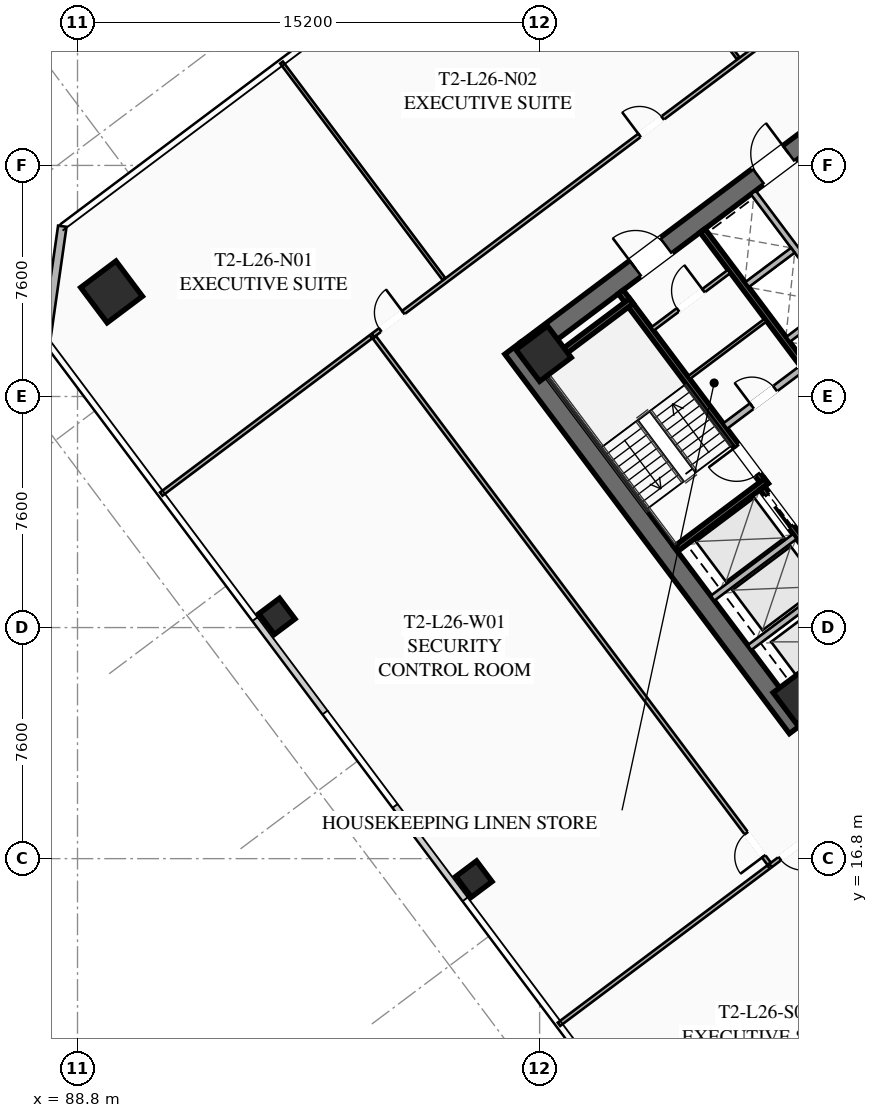
"""IFC4 building model, lengths in metres.
Left out: names, types, materials, properties, quantities, classifications, styles, units other than length and angle.
Written with IfcOpenShell. Run it as: python <this file> out.ifc"""

import sys

from ifc_helpers import new_model, si_unit, direction, frame, frame_2d, origin, origin_2d, place, context, subcontext, project, spatial, rectangle, hollow_rectangle, extrude, element, fill, save


model = new_model("IFC4")
c1 = context("Model", 3, precision=1e-05, world=origin(), true_north=direction((0.0, 1.0)))
c2 = subcontext(c1, "Body", "Model", "MODEL_VIEW")
j1 = project(units=[si_unit("LENGTHUNIT", "METRE"), si_unit("PLANEANGLEUNIT", "RADIAN")], contexts=[c1])
p1 = place(None, origin())
s1 = spatial("IfcSite", under=j1, at=p1, CompositionType="ELEMENT")
p2 = place(p1, origin())
s2 = spatial("IfcBuilding", under=s1, at=p2, CompositionType="ELEMENT")
p3 = place(p2, frame((0.0, 0.0, 99.15)))
s3 = spatial("IfcBuildingStorey", under=s2, at=p3, CompositionType="ELEMENT", Elevation=99.15)
p4 = place(p3, frame((112.476, 21.107, 0.0), z_axis=(0.0, 0.0, 1.0), x_axis=(-0.600005007985, 0.799996243986, 0.0)))
e1 = element("IfcWall", 1, at=p4, inside=s3, PredefinedType="SHEAR", context=c2, shape_type="SweptSolid", body=[
    extrude(rectangle(XDim=15.6, YDim=0.65, at=frame_2d((7.8, 0.0))), origin(), (0.0, 0.0, 1.0), 3.55),
])
p5 = place(p3, frame((124.429, 30.478, 0.0), z_axis=(0.0, 0.0, 1.0), x_axis=(-0.799998028465, -0.600002628705, 0.0)))
e2 = element("IfcWall", 2, at=p5, inside=s3, PredefinedType="SHEAR", context=c2, shape_type="SweptSolid", body=[
    extrude(rectangle(XDim=14.86, YDim=0.65, at=frame_2d((7.43, 0.0))), origin(), (0.0, 0.0, 1.0), 3.55),
])
p6 = place(p5, frame((9.13, 0.0, 0.0)))
e3 = element("IfcOpeningElement", 3, at=p6, cuts=e2, PredefinedType="OPENING", context=c2, shape_type="SweptSolid", body=[
    extrude(rectangle(XDim=1.25, YDim=2.25, at=frame_2d((0.625, 1.125))), frame((0.0, 0.335, 0.0), z_axis=(0.0, -1.0, 0.0), x_axis=(1.0, 0.0, 0.0)), (0.0, 0.0, 1.0), 0.67),
])
p7 = place(p5, frame((4.08, 0.0, 0.0)))
e4 = element("IfcOpeningElement", 4, at=p7, cuts=e2, PredefinedType="OPENING", context=c2, shape_type="SweptSolid", body=[
    extrude(rectangle(XDim=1.25, YDim=2.25, at=frame_2d((0.625, 1.125))), frame((0.0, 0.335, 0.0), z_axis=(0.0, -1.0, 0.0), x_axis=(1.0, 0.0, 0.0)), (0.0, 0.0, 1.0), 0.67),
])
p8 = place(p3, frame((103.571, 33.522, 0.0), z_axis=(0.0, 0.0, 1.0), x_axis=(0.799998028465, 0.600002628705, 0.0)))
e5 = element("IfcWall", 5, at=p8, inside=s3, PredefinedType="SHEAR", context=c2, shape_type="SweptSolid", body=[
    extrude(rectangle(XDim=14.86, YDim=0.65, at=frame_2d((7.43, 0.0))), origin(), (0.0, 0.0, 1.0), 3.55),
])
p9 = place(p8, frame((4.48, 0.0, 0.0)))
e6 = element("IfcOpeningElement", 6, at=p9, cuts=e5, PredefinedType="OPENING", context=c2, shape_type="SweptSolid", body=[
    extrude(rectangle(XDim=1.25, YDim=2.25, at=frame_2d((0.625, 1.125))), frame((0.0, 0.335, 0.0), z_axis=(0.0, -1.0, 0.0), x_axis=(1.0, 0.0, 0.0)), (0.0, 0.0, 1.0), 0.67),
])
p10 = place(p8, frame((9.53, 0.0, 0.0)))
e7 = element("IfcOpeningElement", 7, at=p10, cuts=e5, PredefinedType="OPENING", context=c2, shape_type="SweptSolid", body=[
    extrude(rectangle(XDim=1.25, YDim=2.25, at=frame_2d((0.625, 1.125))), frame((0.0, 0.335, 0.0), z_axis=(0.0, -1.0, 0.0), x_axis=(1.0, 0.0, 0.0)), (0.0, 0.0, 1.0), 0.67),
])
for number, where, z_axis, x_axis in (
    (8, (112.59, 22.13, 0.0), (0.0, 0.0, 1.0), (0.8, 0.6, 0.0)),
    (9, (104.13, 33.41, 0.0), (0.0, 0.0, 1.0), (0.8, 0.6, 0.0)),
):
    element("IfcColumn", number, at=place(p3, frame(where, z_axis=z_axis, x_axis=x_axis)), inside=s3, PredefinedType="COLUMN", context=c2, shape_type="SweptSolid", body=[
        extrude(hollow_rectangle(XDim=1.3, YDim=1.3, WallThickness=0.05, at=origin_2d()), origin(), (0.0, 0.0, 1.0), 3.35),
    ])
p11 = place(p3, frame((89.92, 35.44, 0.0), z_axis=(0.0, 0.0, 1.0), x_axis=(0.799999996291, 0.600000004945, 0.0)))
e10 = element("IfcColumn", 10, at=p11, inside=s3, PredefinedType="COLUMN", context=c2, shape_type="SweptSolid", body=[
    extrude(hollow_rectangle(XDim=1.45, YDim=1.45, WallThickness=0.055, at=origin_2d()), origin(), (0.0, 0.0, 1.0), 3.35),
])
for number, where, z_axis, x_axis in (
    (11, (95.36, 24.77, 0.0), (0.0, 0.0, 1.0), (0.8, 0.6, 0.0)),
    (12, (101.84, 16.13, 0.0), (0.0, 0.0, 1.0), (0.8, 0.6, 0.0)),
):
    element("IfcColumn", number, at=place(p3, frame(where, z_axis=z_axis, x_axis=x_axis)), inside=s3, PredefinedType="COLUMN", context=c2, shape_type="SweptSolid", body=[
        extrude(hollow_rectangle(XDim=0.85, YDim=0.85, WallThickness=0.035, at=origin_2d()), origin(), (0.0, 0.0, 1.0), 3.35),
    ])
p12 = place(p3, frame((87.76, 33.82, 0.0), z_axis=(0.0, 0.0, 1.0), x_axis=(0.141430307517, 0.989948214866, 0.0)))
e13 = element("IfcWall", 13, at=p12, inside=s3, PredefinedType="SOLIDWALL", context=c2, shape_type="SweptSolid", body=[
    extrude(rectangle(XDim=3.818, YDim=0.28, at=frame_2d((1.909, 0.0))), origin(), (0.0, 0.0, 1.0), 3.35),
])
p13 = place(p3, frame((111.44, 29.08, 0.0), z_axis=(0.0, 0.0, 1.0), x_axis=(-0.600009827119, 0.799992629566, 0.0)))
e14 = element("IfcWall", 14, at=p13, inside=s3, PredefinedType="SHEAR", context=c2, shape_type="SweptSolid", body=[
    extrude(rectangle(XDim=7.95, YDim=0.2, at=frame_2d((3.975, 0.0))), origin(), (0.0, 0.0, 1.0), 3.35),
])
p14 = place(p13, frame((0.45, 0.0, 0.0)))
e15 = element("IfcOpeningElement", 15, at=p14, cuts=e14, PredefinedType="OPENING", context=c2, shape_type="SweptSolid", body=[
    extrude(rectangle(XDim=1.15, YDim=2.2, at=frame_2d((0.575, 1.1))), frame((0.0, 0.11, 0.0), z_axis=(0.0, -1.0, 0.0), x_axis=(1.0, 0.0, 0.0)), (0.0, 0.0, 1.0), 0.22),
])
for number, where, z_axis, x_axis in (
    (16, (108.476, 26.982, 0.0), (0.0, 0.0, 1.0), (0.8, 0.6, 0.0)),
    (17, (104.036, 32.902, 0.0), (0.0, 0.0, 1.0), (0.8, 0.6, 0.0)),
):
    element("IfcWall", number, at=place(p3, frame(where, z_axis=z_axis, x_axis=x_axis)), inside=s3, PredefinedType="SHEAR", context=c2, shape_type="SweptSolid", body=[
        extrude(rectangle(XDim=3.73, YDim=0.2, at=frame_2d((1.865, 0.0))), origin(), (0.0, 0.0, 1.0), 3.35),
    ])
p15 = place(p3, frame((117.938, 26.016, 0.0), z_axis=(0.0, 0.0, 1.0), x_axis=(-0.600005463273, 0.799995902516, 0.0)))
e18 = element("IfcWall", 18, at=p15, inside=s3, PredefinedType="SHEAR", context=c2, shape_type="SweptSolid", body=[
    extrude(rectangle(XDim=14.3, YDim=0.2, at=frame_2d((7.15, 0.0))), origin(), (0.0, 0.0, 1.0), 3.35),
])
p16 = place(p3, frame((110.104, 31.028, 0.0), z_axis=(0.0, 0.0, 1.0), x_axis=(0.800018601094, 0.59997519774, 0.0)))
e19 = element("IfcWall", 19, at=p16, inside=s3, PredefinedType="SOLIDWALL", context=c2, shape_type="SweptSolid", body=[
    extrude(rectangle(XDim=3.15, YDim=0.22, at=frame_2d((1.575, 0.0))), origin(), (0.0, 0.0, 1.0), 2.703),
])
p17 = place(p16, frame((1.1, 0.0, 0.0)))
e20 = element("IfcOpeningElement", 20, at=p17, cuts=e19, PredefinedType="OPENING", context=c2, shape_type="SweptSolid", body=[
    extrude(rectangle(XDim=0.95, YDim=2.05, at=frame_2d((0.475, 1.025))), frame((0.0, 0.12, 0.0), z_axis=(0.0, -1.0, 0.0), x_axis=(1.0, 0.0, 0.0)), (0.0, 0.0, 1.0), 0.24),
])
p18 = place(p3, frame((115.13, 23.91, 0.0), z_axis=(0.0, 0.0, 1.0), x_axis=(-0.599975393228, 0.800018454488, 0.0)))
e21 = element("IfcWall", 21, at=p18, inside=s3, PredefinedType="SHEAR", context=c2, shape_type="SweptSolid", body=[
    extrude(rectangle(XDim=6.35, YDim=0.2, at=frame_2d((3.175, 0.0))), origin(), (0.0, 0.0, 1.0), 3.35),
])
p19 = place(p18, frame((4.775, 0.0, 0.0)))
e22 = element("IfcOpeningElement", 22, at=p19, cuts=e21, PredefinedType="OPENING", context=c2, shape_type="SweptSolid", body=[
    extrude(rectangle(XDim=1.3, YDim=2.25, at=frame_2d((0.65, 1.125))), frame((0.0, 0.11, 0.0), z_axis=(0.0, -1.0, 0.0), x_axis=(1.0, 0.0, 0.0)), (0.0, 0.0, 1.0), 0.22),
])
p20 = place(p18, frame((2.775, 0.0, 0.0)))
e23 = element("IfcOpeningElement", 23, at=p20, cuts=e21, PredefinedType="OPENING", context=c2, shape_type="SweptSolid", body=[
    extrude(rectangle(XDim=1.3, YDim=2.25, at=frame_2d((0.65, 1.125))), frame((0.0, 0.11, 0.0), z_axis=(0.0, -1.0, 0.0), x_axis=(1.0, 0.0, 0.0)), (0.0, 0.0, 1.0), 0.22),
])
p21 = place(p18, frame((0.575, 0.0, 0.0)))
e24 = element("IfcOpeningElement", 24, at=p21, cuts=e21, PredefinedType="OPENING", context=c2, shape_type="SweptSolid", body=[
    extrude(rectangle(XDim=1.3, YDim=2.25, at=frame_2d((0.65, 1.125))), frame((0.0, 0.11, 0.0), z_axis=(0.0, -1.0, 0.0), x_axis=(1.0, 0.0, 0.0)), (0.0, 0.0, 1.0), 0.22),
])
for number, where, z_axis, x_axis in (
    (25, (110.906, 23.742, 0.0), (0.0, 0.0, 1.0), (0.8, 0.6, 0.0)),
    (26, (109.688, 25.366, 0.0), (0.0, 0.0, 1.0), (0.8, 0.6, 0.0)),
):
    element("IfcWall", number, at=place(p3, frame(where, z_axis=z_axis, x_axis=x_axis)), inside=s3, PredefinedType="SOLIDWALL", context=c2, shape_type="SweptSolid", body=[
        extrude(rectangle(XDim=3.38, YDim=0.2, at=frame_2d((1.69, 0.0))), origin(), (0.0, 0.0, 1.0), 3.35),
    ])
p22 = place(p3, frame((107.71, 34.22, 0.0), z_axis=(0.0, 0.0, 1.0), x_axis=(0.799981399002, 0.60002480053, 0.0)))
e27 = element("IfcWall", 27, at=p22, inside=s3, PredefinedType="PARTITIONING", context=c2, shape_type="SweptSolid", body=[
    extrude(rectangle(XDim=3.15, YDim=0.135, at=frame_2d((1.575, 0.0))), origin(), (0.0, 0.0, 1.0), 2.703),
])
p23 = place(p22, frame((1.05, 0.0, 0.0)))
e28 = element("IfcOpeningElement", 28, at=p23, cuts=e27, PredefinedType="OPENING", context=c2, shape_type="SweptSolid", body=[
    extrude(rectangle(XDim=1.05, YDim=2.2, at=frame_2d((0.525, 1.1))), frame((0.0, 0.077, 0.0), z_axis=(0.0, -1.0, 0.0), x_axis=(1.0, 0.0, 0.0)), (0.0, 0.0, 1.0), 0.155),
])
p24 = place(p3, frame((108.91, 32.62, 0.0), z_axis=(0.0, 0.0, 1.0), x_axis=(0.800018601094, 0.59997519774, 0.0)))
e29 = element("IfcWall", 29, at=p24, inside=s3, PredefinedType="PARTITIONING", context=c2, shape_type="SweptSolid", body=[
    extrude(rectangle(XDim=3.15, YDim=0.11, at=frame_2d((1.575, 0.0))), origin(), (0.0, 0.0, 1.0), 2.703),
])
p25 = place(p3, frame((115.11, 33.27, 0.0), z_axis=(0.0, 0.0, 1.0), x_axis=(-0.600011488909, 0.79999138319, 0.0)))
e30 = element("IfcWall", 30, at=p25, inside=s3, PredefinedType="SOLIDWALL", context=c2, shape_type="SweptSolid", body=[
    extrude(rectangle(XDim=6.8, YDim=0.2, at=frame_2d((3.4, 0.0))), origin(), (0.0, 0.0, 1.0), 3.35),
])
p26 = place(p3, frame((112.176, 33.882, 0.0), z_axis=(0.0, 0.0, 1.0), x_axis=(0.8, 0.6, 0.0)))
e31 = element("IfcWall", 31, at=p26, inside=s3, PredefinedType="SOLIDWALL", context=c2, shape_type="SweptSolid", body=[
    extrude(rectangle(XDim=1.88, YDim=0.2, at=frame_2d((0.94, 0.0))), origin(), (0.0, 0.0, 1.0), 3.35),
])
p27 = place(p3, frame((110.826, 35.682, 0.0), z_axis=(0.0, 0.0, 1.0), x_axis=(0.799984418148, 0.600020775241, 0.0)))
e32 = element("IfcWall", 32, at=p27, inside=s3, PredefinedType="SOLIDWALL", context=c2, shape_type="SweptSolid", body=[
    extrude(rectangle(XDim=1.88, YDim=0.2, at=frame_2d((0.94, 0.0))), origin(), (0.0, 0.0, 1.0), 3.35),
])
p28 = place(p3, frame((98.516, 34.012, 0.0), z_axis=(0.0, 0.0, 1.0), x_axis=(0.8, 0.6, 0.0)))
e33 = element("IfcWall", 33, at=p28, inside=s3, PredefinedType="PARTITIONING", context=c2, shape_type="SweptSolid", body=[
    extrude(rectangle(XDim=28.23, YDim=0.135, at=frame_2d((14.115, 0.0))), origin(), (0.0, 0.0, 1.0), 2.703),
])
p29 = place(p28, frame((0.3, 0.0, 0.0)))
e34 = element("IfcOpeningElement", 34, at=p29, cuts=e33, PredefinedType="OPENING", context=c2, shape_type="SweptSolid", body=[
    extrude(rectangle(XDim=0.95, YDim=2.05, at=frame_2d((0.475, 1.025))), frame((0.0, 0.077, 0.0), z_axis=(0.0, -1.0, 0.0), x_axis=(1.0, 0.0, 0.0)), (0.0, 0.0, 1.0), 0.155),
])
p30 = place(p28, frame((10.962, 0.0, 0.0)))
e35 = element("IfcOpeningElement", 35, at=p30, cuts=e33, PredefinedType="OPENING", context=c2, shape_type="SweptSolid", body=[
    extrude(rectangle(XDim=0.95, YDim=2.05, at=frame_2d((0.475, 1.025))), frame((0.0, 0.077, 0.0), z_axis=(0.0, -1.0, 0.0), x_axis=(1.0, 0.0, 0.0)), (0.0, 0.0, 1.0), 0.155),
])
p31 = place(p28, frame((26.98, 0.0, 0.0)))
e36 = element("IfcOpeningElement", 36, at=p31, cuts=e33, PredefinedType="OPENING", context=c2, shape_type="SweptSolid", body=[
    extrude(rectangle(XDim=0.95, YDim=2.05, at=frame_2d((0.475, 1.025))), frame((0.0, 0.077, 0.0), z_axis=(0.0, -1.0, 0.0), x_axis=(1.0, 0.0, 0.0)), (0.0, 0.0, 1.0), 0.155),
])
for number, where, z_axis, x_axis in (
    (37, (100.852, 35.864, 0.0), (0.0, 0.0, 1.0), (-0.6, 0.8, 0.0)),
    (38, (110.532, 43.124, 0.0), (0.0, 0.0, 1.0), (-0.6, 0.8, 0.0)),
):
    element("IfcWall", number, at=place(p3, frame(where, z_axis=z_axis, x_axis=x_axis)), inside=s3, PredefinedType="PARTITIONING", context=c2, shape_type="SweptSolid", body=[
        extrude(rectangle(XDim=8.9, YDim=0.11, at=frame_2d((4.45, 0.0))), origin(), (0.0, 0.0, 1.0), 2.703),
    ])
p32 = place(p3, frame((134.18, 33.51, 0.0), z_axis=(0.0, 0.0, 1.0), x_axis=(-0.8, -0.6, 0.0)))
e39 = element("IfcWall", 39, at=p32, inside=s3, PredefinedType="PARTITIONING", context=c2, shape_type="SweptSolid", body=[
    extrude(rectangle(XDim=28.23, YDim=0.135, at=frame_2d((14.115, 0.0))), origin(), (0.0, 0.0, 1.0), 2.703),
])
p33 = place(p32, frame((26.9, 0.0, 0.0)))
e40 = element("IfcOpeningElement", 40, at=p33, cuts=e39, PredefinedType="OPENING", context=c2, shape_type="SweptSolid", body=[
    extrude(rectangle(XDim=0.95, YDim=2.05, at=frame_2d((0.475, 1.025))), frame((0.0, 0.077, 0.0), z_axis=(0.0, -1.0, 0.0), x_axis=(1.0, 0.0, 0.0)), (0.0, 0.0, 1.0), 0.155),
])
p34 = place(p32, frame((16.296, 0.0, 0.0)))
e41 = element("IfcOpeningElement", 41, at=p34, cuts=e39, PredefinedType="OPENING", context=c2, shape_type="SweptSolid", body=[
    extrude(rectangle(XDim=0.95, YDim=2.05, at=frame_2d((0.475, 1.025))), frame((0.0, 0.077, 0.0), z_axis=(0.0, -1.0, 0.0), x_axis=(1.0, 0.0, 0.0)), (0.0, 0.0, 1.0), 0.155),
])
p35 = place(p32, frame((10.433, 0.0, 0.0)))
e42 = element("IfcOpeningElement", 42, at=p35, cuts=e39, PredefinedType="OPENING", context=c2, shape_type="SweptSolid", body=[
    extrude(rectangle(XDim=0.95, YDim=2.05, at=frame_2d((0.475, 1.025))), frame((0.0, 0.077, 0.0), z_axis=(0.0, -1.0, 0.0), x_axis=(1.0, 0.0, 0.0)), (0.0, 0.0, 1.0), 0.155),
])
p36 = place(p32, frame((0.38, 0.0, 0.0)))
e43 = element("IfcOpeningElement", 43, at=p36, cuts=e39, PredefinedType="OPENING", context=c2, shape_type="SweptSolid", body=[
    extrude(rectangle(XDim=0.95, YDim=2.05, at=frame_2d((0.475, 1.025))), frame((0.0, 0.077, 0.0), z_axis=(0.0, -1.0, 0.0), x_axis=(1.0, 0.0, 0.0)), (0.0, 0.0, 1.0), 0.155),
])
p37 = place(p3, frame((111.548, 16.636, 0.0), z_axis=(0.0, 0.0, 1.0), x_axis=(-0.600003610192, 0.799997292343, 0.0)))
e44 = element("IfcWall", 44, at=p37, inside=s3, PredefinedType="PARTITIONING", context=c2, shape_type="SweptSolid", body=[
    extrude(rectangle(XDim=21.64, YDim=0.135, at=frame_2d((10.82, 0.0))), origin(), (0.0, 0.0, 1.0), 2.703),
])
p38 = place(p37, frame((0.3, 0.0, 0.0)))
e45 = element("IfcOpeningElement", 45, at=p38, cuts=e44, PredefinedType="OPENING", context=c2, shape_type="SweptSolid", body=[
    extrude(rectangle(XDim=0.95, YDim=2.05, at=frame_2d((0.475, 1.025))), frame((0.0, 0.077, 0.0), z_axis=(0.0, -1.0, 0.0), x_axis=(1.0, 0.0, 0.0)), (0.0, 0.0, 1.0), 0.155),
])
p39 = place(p3, frame((98.452, 33.964, 0.0), z_axis=(0.0, 0.0, 1.0), x_axis=(-0.799993202584, -0.600009063115, 0.0)))
e46 = element("IfcWall", 46, at=p39, inside=s3, PredefinedType="PARTITIONING", context=c2, shape_type="SweptSolid", body=[
    extrude(rectangle(XDim=8.62, YDim=0.135, at=frame_2d((4.31, 0.0))), origin(), (0.0, 0.0, 1.0), 2.703),
])
p40 = place(p3, frame((104.636, 11.352, 0.0), z_axis=(0.0, 0.0, 1.0), x_axis=(0.800006797429, 0.599990936654, 0.0)))
e47 = element("IfcWall", 47, at=p40, inside=s3, PredefinedType="PARTITIONING", context=c2, shape_type="SweptSolid", body=[
    extrude(rectangle(XDim=8.62, YDim=0.135, at=frame_2d((4.31, 0.0))), origin(), (0.0, 0.0, 1.0), 2.703),
])
p41 = place(p9, origin())
e48 = element("IfcDoor", 48, at=p41, inside=s3, OperationType="SINGLE_SWING_LEFT", PredefinedType="DOOR", context=c2, shape_type="SweptSolid", body=[
    extrude(rectangle(XDim=1.25, YDim=2.25, at=frame_2d((0.625, 1.125))), frame((0.0, 0.025, 0.0), z_axis=(0.0, -1.0, 0.0), x_axis=(1.0, 0.0, 0.0)), (0.0, 0.0, 1.0), 0.05),
])
fill(e6, e48)
p42 = place(p10, origin())
e49 = element("IfcDoor", 49, at=p42, inside=s3, OperationType="SINGLE_SWING_RIGHT", PredefinedType="DOOR", context=c2, shape_type="SweptSolid", body=[
    extrude(rectangle(XDim=1.25, YDim=2.25, at=frame_2d((0.625, 1.125))), frame((0.0, 0.025, 0.0), z_axis=(0.0, -1.0, 0.0), x_axis=(1.0, 0.0, 0.0)), (0.0, 0.0, 1.0), 0.05),
])
fill(e7, e49)
p43 = place(p14, origin())
e50 = element("IfcDoor", 50, at=p43, inside=s3, OperationType="SINGLE_SWING_RIGHT", PredefinedType="DOOR", context=c2, shape_type="SweptSolid", body=[
    extrude(rectangle(XDim=1.15, YDim=2.2, at=frame_2d((0.575, 1.1))), frame((0.0, 0.025, 0.0), z_axis=(0.0, -1.0, 0.0), x_axis=(1.0, 0.0, 0.0)), (0.0, 0.0, 1.0), 0.05),
])
fill(e15, e50)
p44 = place(p23, origin())
e51 = element("IfcDoor", 51, at=p44, inside=s3, OperationType="SINGLE_SWING_RIGHT", PredefinedType="DOOR", context=c2, shape_type="SweptSolid", body=[
    extrude(rectangle(XDim=1.05, YDim=2.2, at=frame_2d((0.525, 1.1))), frame((0.0, 0.025, 0.0), z_axis=(0.0, -1.0, 0.0), x_axis=(1.0, 0.0, 0.0)), (0.0, 0.0, 1.0), 0.05),
])
fill(e28, e51)
p45 = place(p17, origin())
e52 = element("IfcDoor", 52, at=p45, inside=s3, OperationType="SINGLE_SWING_LEFT", PredefinedType="DOOR", context=c2, shape_type="SweptSolid", body=[
    extrude(rectangle(XDim=0.95, YDim=2.05, at=frame_2d((0.475, 1.025))), frame((0.0, 0.025, 0.0), z_axis=(0.0, -1.0, 0.0), x_axis=(1.0, 0.0, 0.0)), (0.0, 0.0, 1.0), 0.05),
])
fill(e20, e52)
p46 = place(p29, origin())
e53 = element("IfcDoor", 53, at=p46, inside=s3, OperationType="SINGLE_SWING_RIGHT", PredefinedType="DOOR", context=c2, shape_type="SweptSolid", body=[
    extrude(rectangle(XDim=0.95, YDim=2.05, at=frame_2d((0.475, 1.025))), frame((0.0, 0.025, 0.0), z_axis=(0.0, -1.0, 0.0), x_axis=(1.0, 0.0, 0.0)), (0.0, 0.0, 1.0), 0.05),
])
fill(e34, e53)
p47 = place(p30, origin())
e54 = element("IfcDoor", 54, at=p47, inside=s3, OperationType="SINGLE_SWING_LEFT", PredefinedType="DOOR", context=c2, shape_type="SweptSolid", body=[
    extrude(rectangle(XDim=0.95, YDim=2.05, at=frame_2d((0.475, 1.025))), frame((0.0, 0.025, 0.0), z_axis=(0.0, -1.0, 0.0), x_axis=(1.0, 0.0, 0.0)), (0.0, 0.0, 1.0), 0.05),
])
fill(e35, e54)
p48 = place(p33, origin())
e55 = element("IfcDoor", 55, at=p48, inside=s3, OperationType="SINGLE_SWING_LEFT", PredefinedType="DOOR", context=c2, shape_type="SweptSolid", body=[
    extrude(rectangle(XDim=0.95, YDim=2.05, at=frame_2d((0.475, 1.025))), frame((0.0, 0.025, 0.0), z_axis=(0.0, -1.0, 0.0), x_axis=(1.0, 0.0, 0.0)), (0.0, 0.0, 1.0), 0.05),
])
fill(e40, e55)
p49 = place(p38, origin())
e56 = element("IfcDoor", 56, at=p49, inside=s3, OperationType="SINGLE_SWING_LEFT", PredefinedType="DOOR", context=c2, shape_type="SweptSolid", body=[
    extrude(rectangle(XDim=0.95, YDim=2.05, at=frame_2d((0.475, 1.025))), frame((0.0, 0.025, 0.0), z_axis=(0.0, -1.0, 0.0), x_axis=(1.0, 0.0, 0.0)), (0.0, 0.0, 1.0), 0.05),
])
fill(e45, e56)
p50 = place(p19, origin())
e57 = element("IfcDoor", 57, at=p50, inside=s3, OperationType="SLIDING_TO_LEFT", PredefinedType="DOOR", context=c2, shape_type="SweptSolid", body=[
    extrude(rectangle(XDim=1.3, YDim=2.25, at=frame_2d((0.65, 1.125))), frame((0.0, 0.025, 0.0), z_axis=(0.0, -1.0, 0.0), x_axis=(1.0, 0.0, 0.0)), (0.0, 0.0, 1.0), 0.05),
])
fill(e22, e57)
save(model, sys.argv[1])
